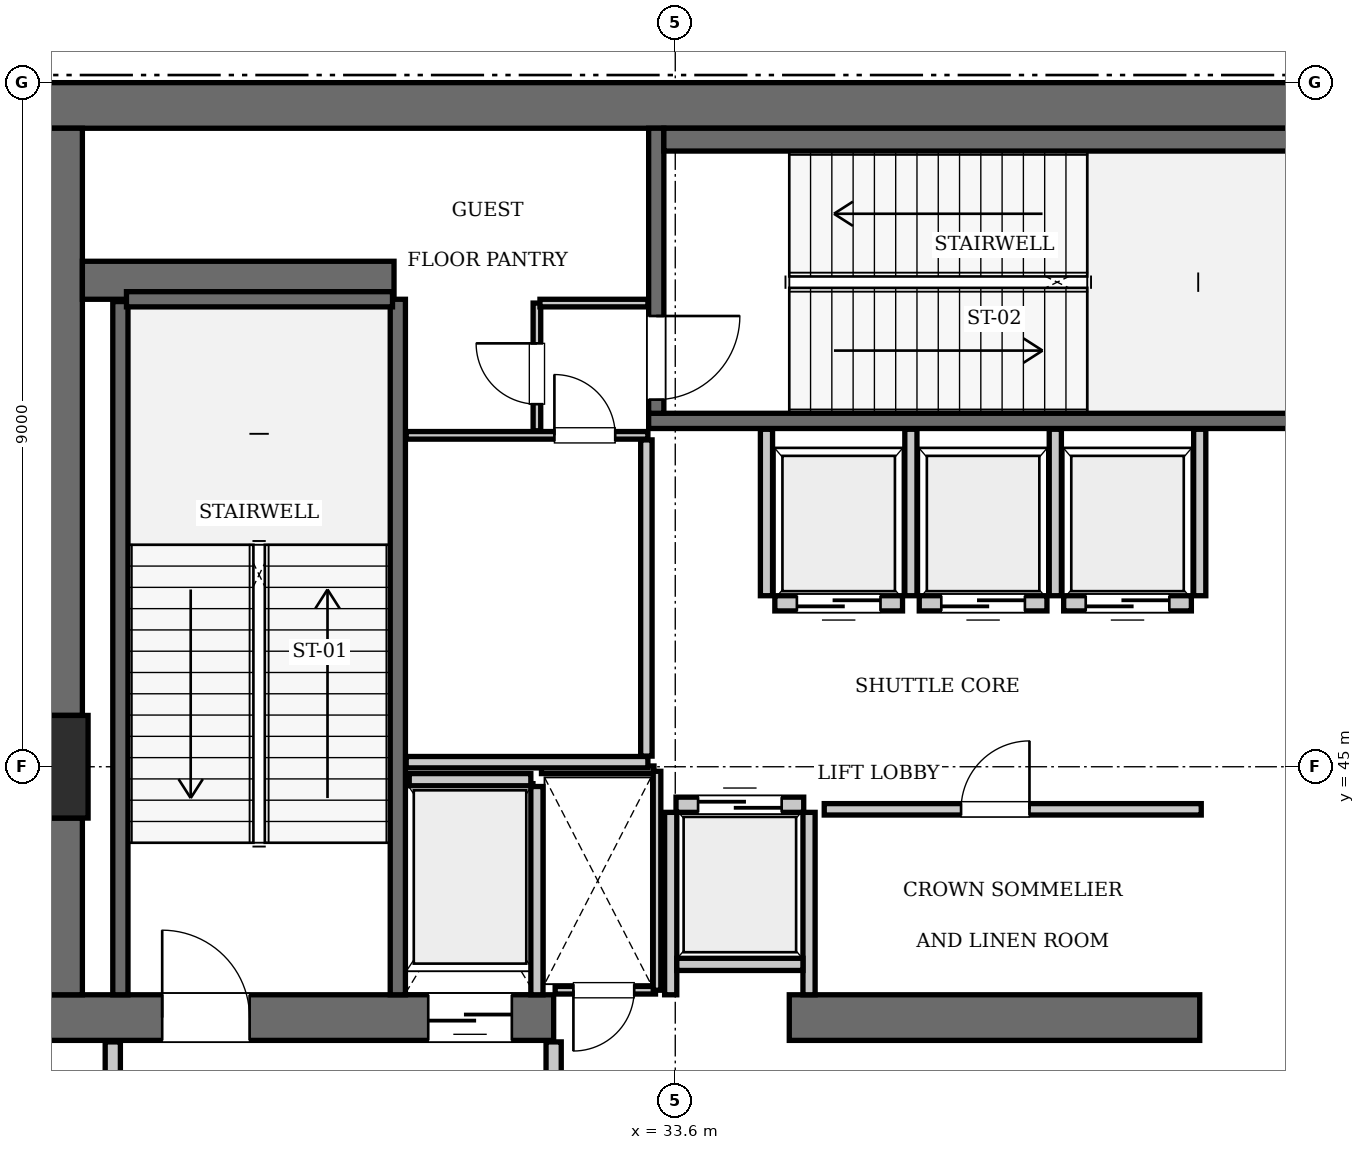
"""IFC4 building model, lengths in metres.
Left out: names, types, materials, properties, quantities, classifications, styles, units other than length and angle.
Written with IfcOpenShell. Run it as: python <this file> out.ifc"""

import sys

from ifc_helpers import new_model, si_unit, direction, frame, frame_2d, origin, origin_2d, place, context, subcontext, project, spatial, rectangle, extrude, element, fill, save


model = new_model("IFC4")
c1 = context("Model", 3, precision=1e-05, world=origin(), true_north=direction((0.0, 1.0)))
c2 = subcontext(c1, "Body", "Model", "MODEL_VIEW")
j1 = project(units=[si_unit("LENGTHUNIT", "METRE"), si_unit("PLANEANGLEUNIT", "RADIAN")], contexts=[c1])
p1 = place(None, origin())
s1 = spatial("IfcSite", under=j1, at=p1, CompositionType="ELEMENT")
p2 = place(p1, origin())
s2 = spatial("IfcBuilding", under=s1, at=p2, CompositionType="ELEMENT")
p3 = place(p2, frame((0.0, 0.0, 359.1)))
s3 = spatial("IfcBuildingStorey", under=s2, at=p3, CompositionType="ELEMENT", Elevation=359.1)
p4 = place(p3, frame((25.2, 45.0, 0.0), z_axis=(0.0, 0.0, 1.0), x_axis=(1.0, 0.0, 0.0)))
e1 = element("IfcColumn", 1, at=p4, inside=s3, PredefinedType="COLUMN", context=c2, shape_type="SweptSolid", body=[
    extrude(rectangle(XDim=1.35, YDim=1.35, at=origin_2d()), origin(), (0.0, 0.0, 1.0), 5.25),
])
p5 = place(p3, frame((25.2, 53.7, 0.0), z_axis=(0.0, 0.0, 1.0), x_axis=(1.0, 0.0, 0.0)))
e2 = element("IfcWall", 2, at=p5, inside=s3, PredefinedType="SHEAR", context=c2, shape_type="SweptSolid", body=[
    extrude(rectangle(XDim=25.2, YDim=0.6, at=frame_2d((12.6, 0.0))), origin(), (0.0, 0.0, 1.0), 5.25),
])
p6 = place(p3, frame((25.2, 41.7, 0.0), z_axis=(0.0, 0.0, 1.0), x_axis=(1.0, 0.0, 0.0)))
e3 = element("IfcWall", 3, at=p6, inside=s3, PredefinedType="SHEAR", context=c2, shape_type="SweptSolid", body=[
    extrude(rectangle(XDim=6.8, YDim=0.6, at=frame_2d((3.4, 0.0))), origin(), (0.0, 0.0, 1.0), 5.25),
])
p7 = place(p6, frame((1.65, 0.0, 0.0)))
e4 = element("IfcOpeningElement", 4, at=p7, cuts=e3, PredefinedType="OPENING", context=c2, shape_type="SweptSolid", body=[
    extrude(rectangle(XDim=1.15, YDim=2.15, at=frame_2d((0.575, 1.075))), frame((0.0, 0.31, 0.0), z_axis=(0.0, -1.0, 0.0), x_axis=(1.0, 0.0, 0.0)), (0.0, 0.0, 1.0), 0.62),
])
p8 = place(p6, frame((5.15, 0.0, 0.0)))
e5 = element("IfcOpeningElement", 5, at=p8, cuts=e3, PredefinedType="OPENING", context=c2, shape_type="SweptSolid", body=[
    extrude(rectangle(XDim=1.1, YDim=2.2, at=frame_2d((0.55, 1.1))), frame((0.0, 0.31, 0.0), z_axis=(0.0, -1.0, 0.0), x_axis=(1.0, 0.0, 0.0)), (0.0, 0.0, 1.0), 0.62),
])
p9 = place(p3, frame((35.1, 41.7, 0.0), z_axis=(0.0, 0.0, 1.0), x_axis=(1.0, 0.0, 0.0)))
e6 = element("IfcWall", 6, at=p9, inside=s3, PredefinedType="SHEAR", context=c2, shape_type="SweptSolid", body=[
    extrude(rectangle(XDim=5.4, YDim=0.6, at=frame_2d((2.7, 0.0))), origin(), (0.0, 0.0, 1.0), 5.25),
])
p10 = place(p3, frame((25.5, 42.0, 0.0), z_axis=(0.0, 0.0, 1.0), x_axis=(0.0, 1.0, 0.0)))
e7 = element("IfcWall", 7, at=p10, inside=s3, PredefinedType="SHEAR", context=c2, shape_type="SweptSolid", body=[
    extrude(rectangle(XDim=2.325, YDim=0.6, at=frame_2d((1.163, 0.0))), origin(), (0.0, 0.0, 1.0), 5.25),
])
p11 = place(p3, frame((25.5, 45.675, 0.0), z_axis=(0.0, 0.0, 1.0), x_axis=(0.0, 1.0, 0.0)))
e8 = element("IfcWall", 8, at=p11, inside=s3, PredefinedType="SHEAR", context=c2, shape_type="SweptSolid", body=[
    extrude(rectangle(XDim=7.725, YDim=0.6, at=frame_2d((3.862, 0.0))), origin(), (0.0, 0.0, 1.0), 5.25),
])
p12 = place(p3, frame((25.8, 51.4, 0.0), z_axis=(0.0, 0.0, 1.0), x_axis=(1.0, 0.0, 0.0)))
e9 = element("IfcWall", 9, at=p12, inside=s3, PredefinedType="SHEAR", context=c2, shape_type="SweptSolid", body=[
    extrude(rectangle(XDim=4.1, YDim=0.5, at=frame_2d((2.05, 0.0))), origin(), (0.0, 0.0, 1.0), 5.25),
])
p13 = place(p3, frame((29.95, 42.0, 0.0), z_axis=(0.0, 0.0, 1.0), x_axis=(0.0, 1.0, 0.0)))
e10 = element("IfcWall", 10, at=p13, inside=s3, PredefinedType="SOLIDWALL", context=c2, shape_type="SweptSolid", body=[
    extrude(rectangle(XDim=9.15, YDim=0.2, at=frame_2d((4.575, 0.0))), origin(), (0.0, 0.0, 1.0), 4.97),
])
p14 = place(p3, frame((26.3, 42.0, 0.0), z_axis=(0.0, 0.0, 1.0), x_axis=(0.0, 1.0, 0.0)))
e11 = element("IfcWall", 11, at=p14, inside=s3, PredefinedType="SOLIDWALL", context=c2, shape_type="SweptSolid", body=[
    extrude(rectangle(XDim=9.12, YDim=0.2, at=frame_2d((4.56, 0.0))), origin(), (0.0, 0.0, 1.0), 4.97),
])
p15 = place(p3, frame((26.38, 51.15, 0.0), z_axis=(0.0, 0.0, 1.0), x_axis=(1.0, 0.0, 0.0)))
e12 = element("IfcWall", 12, at=p15, inside=s3, PredefinedType="SOLIDWALL", context=c2, shape_type="SweptSolid", body=[
    extrude(rectangle(XDim=3.5, YDim=0.2, at=frame_2d((1.75, 0.0))), origin(), (0.0, 0.0, 1.0), 4.97),
])
p16 = place(p3, frame((33.25, 49.55, 0.0), z_axis=(0.0, 0.0, 1.0), x_axis=(1.0, 0.0, 0.0)))
e13 = element("IfcWall", 13, at=p16, inside=s3, PredefinedType="SOLIDWALL", context=c2, shape_type="SweptSolid", body=[
    extrude(rectangle(XDim=9.1, YDim=0.2, at=frame_2d((4.55, 0.0))), origin(), (0.0, 0.0, 1.0), 4.97),
])
p17 = place(p3, frame((33.35, 49.65, 0.0), z_axis=(0.0, 0.0, 1.0), x_axis=(0.0, 1.0, 0.0)))
e14 = element("IfcWall", 14, at=p17, inside=s3, PredefinedType="SOLIDWALL", context=c2, shape_type="SweptSolid", body=[
    extrude(rectangle(XDim=3.75, YDim=0.2, at=frame_2d((1.875, 0.0))), origin(), (0.0, 0.0, 1.0), 4.97),
])
p18 = place(p17, frame((0.18, 0.0, 0.0)))
e15 = element("IfcOpeningElement", 15, at=p18, cuts=e14, PredefinedType="OPENING", context=c2, shape_type="SweptSolid", body=[
    extrude(rectangle(XDim=1.1, YDim=2.15, at=frame_2d((0.55, 1.075))), frame((0.0, 0.11, 0.0), z_axis=(0.0, -1.0, 0.0), x_axis=(1.0, 0.0, 0.0)), (0.0, 0.0, 1.0), 0.22),
])
p19 = place(p3, frame((33.45, 53.25, 0.0), z_axis=(0.0, 0.0, 1.0), x_axis=(1.0, 0.0, 0.0)))
e16 = element("IfcWall", 16, at=p19, inside=s3, PredefinedType="SOLIDWALL", context=c2, shape_type="SweptSolid", body=[
    extrude(rectangle(XDim=8.7, YDim=0.3, at=frame_2d((4.35, 0.0))), origin(), (0.0, 0.0, 1.0), 4.97),
])
p20 = place(p3, frame((34.91, 47.15, 0.0), z_axis=(0.0, 0.0, 1.0), x_axis=(1.0, 0.0, 0.0)))
e17 = element("IfcWall", 17, at=p20, inside=s3, PredefinedType="SOLIDWALL", context=c2, shape_type="SweptSolid", body=[
    extrude(rectangle(XDim=1.68, YDim=0.2, at=frame_2d((0.84, 0.0))), origin(), (0.0, 0.0, 1.0), 4.97),
])
p21 = place(p20, frame((0.29, 0.0, 0.0)))
e18 = element("IfcOpeningElement", 18, at=p21, cuts=e17, PredefinedType="OPENING", context=c2, shape_type="SweptSolid", body=[
    extrude(rectangle(XDim=1.1, YDim=2.2, at=frame_2d((0.55, 1.1))), frame((0.0, 0.11, 0.0), z_axis=(0.0, -1.0, 0.0), x_axis=(1.0, 0.0, 0.0)), (0.0, 0.0, 1.0), 0.22),
])
p22 = place(p3, frame((36.81, 47.15, 0.0), z_axis=(0.0, 0.0, 1.0), x_axis=(1.0, 0.0, 0.0)))
e19 = element("IfcWall", 19, at=p22, inside=s3, PredefinedType="SOLIDWALL", context=c2, shape_type="SweptSolid", body=[
    extrude(rectangle(XDim=1.68, YDim=0.2, at=frame_2d((0.84, 0.0))), origin(), (0.0, 0.0, 1.0), 4.97),
])
p23 = place(p22, frame((0.29, 0.0, 0.0)))
e20 = element("IfcOpeningElement", 20, at=p23, cuts=e19, PredefinedType="OPENING", context=c2, shape_type="SweptSolid", body=[
    extrude(rectangle(XDim=1.1, YDim=2.2, at=frame_2d((0.55, 1.1))), frame((0.0, 0.11, 0.0), z_axis=(0.0, -1.0, 0.0), x_axis=(1.0, 0.0, 0.0)), (0.0, 0.0, 1.0), 0.22),
])
p24 = place(p3, frame((38.71, 47.15, 0.0), z_axis=(0.0, 0.0, 1.0), x_axis=(1.0, 0.0, 0.0)))
e21 = element("IfcWall", 21, at=p24, inside=s3, PredefinedType="SOLIDWALL", context=c2, shape_type="SweptSolid", body=[
    extrude(rectangle(XDim=1.68, YDim=0.2, at=frame_2d((0.84, 0.0))), origin(), (0.0, 0.0, 1.0), 4.97),
])
p25 = place(p24, frame((0.29, 0.0, 0.0)))
e22 = element("IfcOpeningElement", 22, at=p25, cuts=e21, PredefinedType="OPENING", context=c2, shape_type="SweptSolid", body=[
    extrude(rectangle(XDim=1.1, YDim=2.2, at=frame_2d((0.55, 1.1))), frame((0.0, 0.11, 0.0), z_axis=(0.0, -1.0, 0.0), x_axis=(1.0, 0.0, 0.0)), (0.0, 0.0, 1.0), 0.22),
])
p26 = place(p3, frame((33.61, 44.5, 0.0), z_axis=(0.0, 0.0, 1.0), x_axis=(1.0, 0.0, 0.0)))
e23 = element("IfcWall", 23, at=p26, inside=s3, PredefinedType="SOLIDWALL", context=c2, shape_type="SweptSolid", body=[
    extrude(rectangle(XDim=1.68, YDim=0.2, at=frame_2d((0.84, 0.0))), origin(), (0.0, 0.0, 1.0), 4.97),
])
p27 = place(p26, frame((0.29, 0.0, 0.0)))
e24 = element("IfcOpeningElement", 24, at=p27, cuts=e23, PredefinedType="OPENING", context=c2, shape_type="SweptSolid", body=[
    extrude(rectangle(XDim=1.1, YDim=2.2, at=frame_2d((0.55, 1.1))), frame((0.0, 0.11, 0.0), z_axis=(0.0, -1.0, 0.0), x_axis=(1.0, 0.0, 0.0)), (0.0, 0.0, 1.0), 0.22),
])
p28 = place(p3, frame((30.1, 44.83, 0.0), z_axis=(0.0, 0.0, 1.0), x_axis=(1.0, 0.0, 0.0)))
e25 = element("IfcWall", 25, at=p28, inside=s3, PredefinedType="SOLIDWALL", context=c2, shape_type="SweptSolid", body=[
    extrude(rectangle(XDim=1.6, YDim=0.16, at=frame_2d((0.8, 0.0))), origin(), (0.0, 0.0, 1.0), 4.97),
])
p29 = place(p3, frame((31.78, 42.0, 0.0), z_axis=(0.0, 0.0, 1.0), x_axis=(0.0, 1.0, 0.0)))
e26 = element("IfcWall", 26, at=p29, inside=s3, PredefinedType="SOLIDWALL", context=c2, shape_type="SweptSolid", body=[
    extrude(rectangle(XDim=2.74, YDim=0.16, at=frame_2d((1.37, 0.0))), origin(), (0.0, 0.0, 1.0), 4.97),
])
for number, where, z_axis, x_axis in (
    (27, (34.8, 47.25, 0.0), (0.0, 0.0, 1.0), (0.0, 1.0, 0.0)),
    (28, (36.7, 47.25, 0.0), (0.0, 0.0, 1.0), (0.0, 1.0, 0.0)),
    (29, (38.6, 47.25, 0.0), (0.0, 0.0, 1.0), (0.0, 1.0, 0.0)),
    (30, (40.5, 47.25, 0.0), (0.0, 0.0, 1.0), (0.0, 1.0, 0.0)),
):
    element("IfcWall", number, at=place(p3, frame(where, z_axis=z_axis, x_axis=x_axis)), inside=s3, PredefinedType="SOLIDWALL", context=c2, shape_type="SweptSolid", body=[
        extrude(rectangle(XDim=2.19, YDim=0.16, at=frame_2d((1.095, 0.0))), origin(), (0.0, 0.0, 1.0), 4.97),
    ])
for number, where, z_axis, x_axis in (
    (31, (33.54, 42.0, 0.0), (0.0, 0.0, 1.0), (0.0, 1.0, 0.0)),
    (32, (35.36, 42.0, 0.0), (0.0, 0.0, 1.0), (0.0, 1.0, 0.0)),
):
    element("IfcWall", number, at=place(p3, frame(where, z_axis=z_axis, x_axis=x_axis)), inside=s3, PredefinedType="SOLIDWALL", context=c2, shape_type="SweptSolid", body=[
        extrude(rectangle(XDim=2.4, YDim=0.16, at=frame_2d((1.2, 0.0))), origin(), (0.0, 0.0, 1.0), 4.97),
    ])
p30 = place(p3, frame((33.62, 42.4, 0.0), z_axis=(0.0, 0.0, 1.0), x_axis=(1.0, 0.0, 0.0)))
e33 = element("IfcWall", 33, at=p30, inside=s3, PredefinedType="SOLIDWALL", context=c2, shape_type="SweptSolid", body=[
    extrude(rectangle(XDim=1.66, YDim=0.16, at=frame_2d((0.83, 0.0))), origin(), (0.0, 0.0, 1.0), 4.97),
])
for number, where, z_axis, x_axis in (
    (34, (26.2, 38.31, 0.0), (0.0, 0.0, 1.0), (0.0, 1.0, 0.0)),
    (35, (32.0, 38.31, 0.0), (0.0, 0.0, 1.0), (0.0, 1.0, 0.0)),
):
    element("IfcWall", number, at=place(p3, frame(where, z_axis=z_axis, x_axis=x_axis)), inside=s3, PredefinedType="PARTITIONING", context=c2, shape_type="SweptSolid", body=[
        extrude(rectangle(XDim=3.07, YDim=0.2, at=frame_2d((1.535, 0.0))), origin(), (0.0, 0.0, 1.0), 4.97),
    ])
p31 = place(p3, frame((32.02, 42.06, 0.0), z_axis=(0.0, 0.0, 1.0), x_axis=(1.0, 0.0, 0.0)))
e36 = element("IfcWall", 36, at=p31, inside=s3, PredefinedType="PARTITIONING", context=c2, shape_type="SweptSolid", body=[
    extrude(rectangle(XDim=1.32, YDim=0.1, at=frame_2d((0.66, 0.0))), origin(), (0.0, 0.0, 1.0), 4.97),
])
p32 = place(p31, frame((0.24, 0.0, 0.0)))
e37 = element("IfcOpeningElement", 37, at=p32, cuts=e36, PredefinedType="OPENING", context=c2, shape_type="SweptSolid", body=[
    extrude(rectangle(XDim=0.8, YDim=2.05, at=frame_2d((0.4, 1.025))), frame((0.0, 0.06, 0.0), z_axis=(0.0, -1.0, 0.0), x_axis=(1.0, 0.0, 0.0)), (0.0, 0.0, 1.0), 0.12),
])
p33 = place(p3, frame((31.84, 44.96, 0.0), z_axis=(0.0, 0.0, 1.0), x_axis=(1.0, 0.0, 0.0)))
e38 = element("IfcWall", 38, at=p33, inside=s3, PredefinedType="PARTITIONING", context=c2, shape_type="SweptSolid", body=[
    extrude(rectangle(XDim=1.48, YDim=0.1, at=frame_2d((0.74, 0.0))), origin(), (0.0, 0.0, 1.0), 4.97),
])
p34 = place(p3, frame((33.36, 42.06, 0.0), z_axis=(0.0, 0.0, 1.0), x_axis=(0.0, 1.0, 0.0)))
e39 = element("IfcWall", 39, at=p34, inside=s3, PredefinedType="PARTITIONING", context=c2, shape_type="SweptSolid", body=[
    extrude(rectangle(XDim=2.88, YDim=0.1, at=frame_2d((1.44, 0.0))), origin(), (0.0, 0.0, 1.0), 4.97),
])
p35 = place(p3, frame((35.56, 44.44, 0.0), z_axis=(0.0, 0.0, 1.0), x_axis=(1.0, 0.0, 0.0)))
e40 = element("IfcWall", 40, at=p35, inside=s3, PredefinedType="PARTITIONING", context=c2, shape_type="SweptSolid", body=[
    extrude(rectangle(XDim=4.96, YDim=0.15, at=frame_2d((2.48, 0.0))), origin(), (0.0, 0.0, 1.0), 4.97),
])
p36 = place(p35, frame((1.8, 0.0, 0.0)))
e41 = element("IfcOpeningElement", 41, at=p36, cuts=e40, PredefinedType="OPENING", context=c2, shape_type="SweptSolid", body=[
    extrude(rectangle(XDim=0.9, YDim=2.1, at=frame_2d((0.45, 1.05))), frame((0.0, 0.085, 0.0), z_axis=(0.0, -1.0, 0.0), x_axis=(1.0, 0.0, 0.0)), (0.0, 0.0, 1.0), 0.17),
])
p37 = place(p3, frame((30.06, 45.06, 0.0), z_axis=(0.0, 0.0, 1.0), x_axis=(1.0, 0.0, 0.0)))
e42 = element("IfcWall", 42, at=p37, inside=s3, PredefinedType="PARTITIONING", context=c2, shape_type="SweptSolid", body=[
    extrude(rectangle(XDim=3.18, YDim=0.15, at=frame_2d((1.59, 0.0))), origin(), (0.0, 0.0, 1.0), 4.97),
])
p38 = place(p3, frame((33.22, 45.14, 0.0), z_axis=(0.0, 0.0, 1.0), x_axis=(0.0, 1.0, 0.0)))
e43 = element("IfcWall", 43, at=p38, inside=s3, PredefinedType="PARTITIONING", context=c2, shape_type="SweptSolid", body=[
    extrude(rectangle(XDim=4.16, YDim=0.15, at=frame_2d((2.08, 0.0))), origin(), (0.0, 0.0, 1.0), 4.97),
])
p39 = place(p3, frame((30.06, 49.36, 0.0), z_axis=(0.0, 0.0, 1.0), x_axis=(1.0, 0.0, 0.0)))
e44 = element("IfcWall", 44, at=p39, inside=s3, PredefinedType="PARTITIONING", context=c2, shape_type="SweptSolid", body=[
    extrude(rectangle(XDim=3.18, YDim=0.1, at=frame_2d((1.59, 0.0))), origin(), (0.0, 0.0, 1.0), 4.97),
])
p40 = place(p39, frame((1.95, 0.0, 0.0)))
e45 = element("IfcOpeningElement", 45, at=p40, cuts=e44, PredefinedType="OPENING", context=c2, shape_type="SweptSolid", body=[
    extrude(rectangle(XDim=0.8, YDim=2.05, at=frame_2d((0.4, 1.025))), frame((0.0, 0.06, 0.0), z_axis=(0.0, -1.0, 0.0), x_axis=(1.0, 0.0, 0.0)), (0.0, 0.0, 1.0), 0.12),
])
p41 = place(p3, frame((31.78, 49.42, 0.0), z_axis=(0.0, 0.0, 1.0), x_axis=(0.0, 1.0, 0.0)))
e46 = element("IfcWall", 46, at=p41, inside=s3, PredefinedType="PARTITIONING", context=c2, shape_type="SweptSolid", body=[
    extrude(rectangle(XDim=1.68, YDim=0.1, at=frame_2d((0.84, 0.0))), origin(), (0.0, 0.0, 1.0), 4.97),
])
p42 = place(p41, frame((0.35, 0.0, 0.0)))
e47 = element("IfcOpeningElement", 47, at=p42, cuts=e46, PredefinedType="OPENING", context=c2, shape_type="SweptSolid", body=[
    extrude(rectangle(XDim=0.8, YDim=2.05, at=frame_2d((0.4, 1.025))), frame((0.0, 0.06, 0.0), z_axis=(0.0, -1.0, 0.0), x_axis=(1.0, 0.0, 0.0)), (0.0, 0.0, 1.0), 0.12),
])
p43 = place(p3, frame((31.82, 51.1, 0.0), z_axis=(0.0, 0.0, 1.0), x_axis=(1.0, 0.0, 0.0)))
e48 = element("IfcWall", 48, at=p43, inside=s3, PredefinedType="PARTITIONING", context=c2, shape_type="SweptSolid", body=[
    extrude(rectangle(XDim=1.42, YDim=0.1, at=frame_2d((0.71, 0.0))), origin(), (0.0, 0.0, 1.0), 4.97),
])
p44 = place(p7, origin())
e49 = element("IfcDoor", 49, at=p44, inside=s3, OperationType="SINGLE_SWING_LEFT", PredefinedType="DOOR", context=c2, shape_type="SweptSolid", body=[
    extrude(rectangle(XDim=1.15, YDim=2.15, at=frame_2d((0.575, 1.075))), frame((0.0, 0.025, 0.0), z_axis=(0.0, -1.0, 0.0), x_axis=(1.0, 0.0, 0.0)), (0.0, 0.0, 1.0), 0.05),
])
fill(e4, e49)
p45 = place(p18, frame((1.1, 0.0, 0.0), z_axis=(0.0, 0.0, 1.0), x_axis=(-1.0, 0.0, 0.0)))
e50 = element("IfcDoor", 50, at=p45, inside=s3, OperationType="SINGLE_SWING_LEFT", PredefinedType="DOOR", context=c2, shape_type="SweptSolid", body=[
    extrude(rectangle(XDim=1.1, YDim=2.15, at=frame_2d((0.55, 1.075))), frame((0.0, 0.025, 0.0), z_axis=(0.0, -1.0, 0.0), x_axis=(1.0, 0.0, 0.0)), (0.0, 0.0, 1.0), 0.05),
])
fill(e15, e50)
p46 = place(p21, frame((1.1, 0.0, 0.0), z_axis=(0.0, 0.0, 1.0), x_axis=(-1.0, 0.0, 0.0)))
e51 = element("IfcDoor", 51, at=p46, inside=s3, OperationType="SLIDING_TO_RIGHT", PredefinedType="DOOR", context=c2, shape_type="SweptSolid", body=[
    extrude(rectangle(XDim=1.1, YDim=2.2, at=frame_2d((0.55, 1.1))), frame((0.0, 0.025, 0.0), z_axis=(0.0, -1.0, 0.0), x_axis=(1.0, 0.0, 0.0)), (0.0, 0.0, 1.0), 0.05),
])
fill(e18, e51)
p47 = place(p23, frame((1.1, 0.0, 0.0), z_axis=(0.0, 0.0, 1.0), x_axis=(-1.0, 0.0, 0.0)))
e52 = element("IfcDoor", 52, at=p47, inside=s3, OperationType="SLIDING_TO_RIGHT", PredefinedType="DOOR", context=c2, shape_type="SweptSolid", body=[
    extrude(rectangle(XDim=1.1, YDim=2.2, at=frame_2d((0.55, 1.1))), frame((0.0, 0.025, 0.0), z_axis=(0.0, -1.0, 0.0), x_axis=(1.0, 0.0, 0.0)), (0.0, 0.0, 1.0), 0.05),
])
fill(e20, e52)
p48 = place(p25, frame((1.1, 0.0, 0.0), z_axis=(0.0, 0.0, 1.0), x_axis=(-1.0, 0.0, 0.0)))
e53 = element("IfcDoor", 53, at=p48, inside=s3, OperationType="SLIDING_TO_RIGHT", PredefinedType="DOOR", context=c2, shape_type="SweptSolid", body=[
    extrude(rectangle(XDim=1.1, YDim=2.2, at=frame_2d((0.55, 1.1))), frame((0.0, 0.025, 0.0), z_axis=(0.0, -1.0, 0.0), x_axis=(1.0, 0.0, 0.0)), (0.0, 0.0, 1.0), 0.05),
])
fill(e22, e53)
p49 = place(p27, origin())
e54 = element("IfcDoor", 54, at=p49, inside=s3, OperationType="SLIDING_TO_RIGHT", PredefinedType="DOOR", context=c2, shape_type="SweptSolid", body=[
    extrude(rectangle(XDim=1.1, YDim=2.2, at=frame_2d((0.55, 1.1))), frame((0.0, 0.025, 0.0), z_axis=(0.0, -1.0, 0.0), x_axis=(1.0, 0.0, 0.0)), (0.0, 0.0, 1.0), 0.05),
])
fill(e24, e54)
p50 = place(p8, frame((1.1, 0.0, 0.0), z_axis=(0.0, 0.0, 1.0), x_axis=(-1.0, 0.0, 0.0)))
e55 = element("IfcDoor", 55, at=p50, inside=s3, OperationType="SLIDING_TO_LEFT", PredefinedType="DOOR", context=c2, shape_type="SweptSolid", body=[
    extrude(rectangle(XDim=1.1, YDim=2.2, at=frame_2d((0.55, 1.1))), frame((0.0, 0.025, 0.0), z_axis=(0.0, -1.0, 0.0), x_axis=(1.0, 0.0, 0.0)), (0.0, 0.0, 1.0), 0.05),
])
fill(e5, e55)
p51 = place(p32, frame((0.8, 0.0, 0.0), z_axis=(0.0, 0.0, 1.0), x_axis=(-1.0, 0.0, 0.0)))
e56 = element("IfcDoor", 56, at=p51, inside=s3, OperationType="SINGLE_SWING_RIGHT", PredefinedType="DOOR", context=c2, shape_type="SweptSolid", body=[
    extrude(rectangle(XDim=0.8, YDim=2.05, at=frame_2d((0.4, 1.025))), frame((0.0, 0.025, 0.0), z_axis=(0.0, -1.0, 0.0), x_axis=(1.0, 0.0, 0.0)), (0.0, 0.0, 1.0), 0.05),
])
fill(e37, e56)
p52 = place(p36, origin())
e57 = element("IfcDoor", 57, at=p52, inside=s3, OperationType="SINGLE_SWING_RIGHT", PredefinedType="DOOR", context=c2, shape_type="SweptSolid", body=[
    extrude(rectangle(XDim=0.9, YDim=2.1, at=frame_2d((0.45, 1.05))), frame((0.0, 0.025, 0.0), z_axis=(0.0, -1.0, 0.0), x_axis=(1.0, 0.0, 0.0)), (0.0, 0.0, 1.0), 0.05),
])
fill(e41, e57)
p53 = place(p40, origin())
e58 = element("IfcDoor", 58, at=p53, inside=s3, OperationType="SINGLE_SWING_LEFT", PredefinedType="DOOR", context=c2, shape_type="SweptSolid", body=[
    extrude(rectangle(XDim=0.8, YDim=2.05, at=frame_2d((0.4, 1.025))), frame((0.0, 0.025, 0.0), z_axis=(0.0, -1.0, 0.0), x_axis=(1.0, 0.0, 0.0)), (0.0, 0.0, 1.0), 0.05),
])
fill(e45, e58)
p54 = place(p42, origin())
e59 = element("IfcDoor", 59, at=p54, inside=s3, OperationType="SINGLE_SWING_RIGHT", PredefinedType="DOOR", context=c2, shape_type="SweptSolid", body=[
    extrude(rectangle(XDim=0.8, YDim=2.05, at=frame_2d((0.4, 1.025))), frame((0.0, 0.025, 0.0), z_axis=(0.0, -1.0, 0.0), x_axis=(1.0, 0.0, 0.0)), (0.0, 0.0, 1.0), 0.05),
])
fill(e47, e59)
save(model, sys.argv[1])
